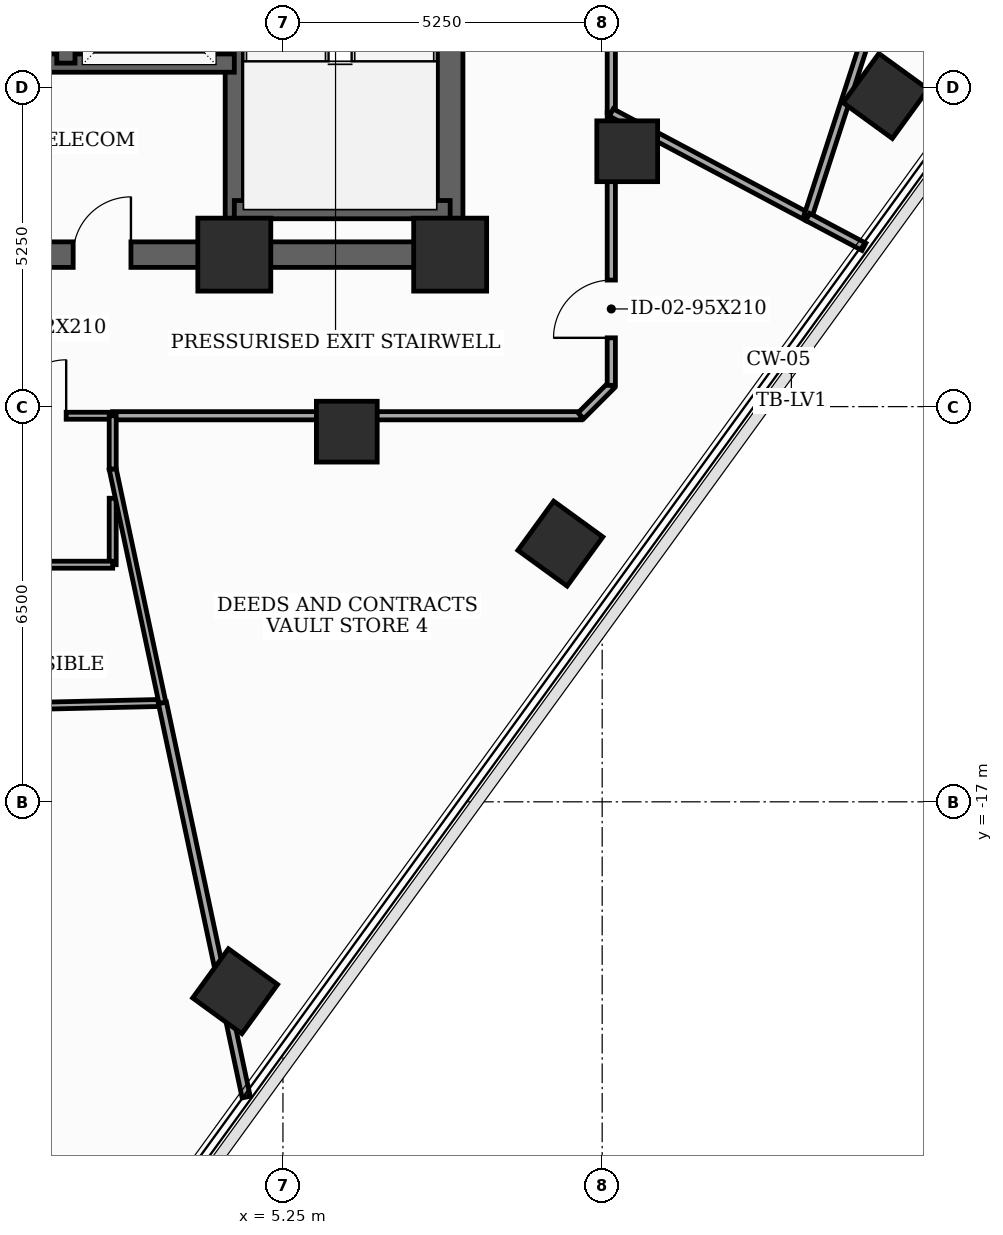
"""IFC4 building model, lengths in metres.
Left out: names, types, materials, properties, quantities, classifications, styles, units other than length and angle.
Written with IfcOpenShell. Run it as: python <this file> out.ifc"""

import sys

from ifc_helpers import new_model, si_unit, direction, frame, frame_2d, origin, origin_2d, place, context, subcontext, project, spatial, rectangle, extrude, element, fill, save


model = new_model("IFC4")
c1 = context("Model", 3, precision=1e-05, world=origin(), true_north=direction((0.0, 1.0)))
c2 = subcontext(c1, "Body", "Model", "MODEL_VIEW")
j1 = project(units=[si_unit("LENGTHUNIT", "METRE"), si_unit("PLANEANGLEUNIT", "RADIAN")], contexts=[c1])
p1 = place(None, origin())
s1 = spatial("IfcSite", under=j1, at=p1, CompositionType="ELEMENT")
p2 = place(p1, origin())
s2 = spatial("IfcBuilding", under=s1, at=p2, CompositionType="ELEMENT")
p3 = place(p2, frame((0.0, 0.0, 226.3)))
s3 = spatial("IfcBuildingStorey", under=s2, at=p3, CompositionType="ELEMENT", Elevation=226.3)
for number, where, z_axis, x_axis in (
    (1, (4.45, -8.0, 0.0), (0.0, 0.0, 1.0), (1.0, 0.0, 0.0)),
    (2, (8.0, -8.0, 0.0), (0.0, 0.0, 1.0), (1.0, 0.0, 0.0)),
):
    element("IfcColumn", number, at=place(p3, frame(where, z_axis=z_axis, x_axis=x_axis)), inside=s3, PredefinedType="COLUMN", context=c2, shape_type="SweptSolid", body=[
        extrude(rectangle(XDim=1.2, YDim=1.2, at=origin_2d()), origin(), (0.0, 0.0, 1.0), 3.7),
    ])
for number, where, z_axis, x_axis in (
    (3, (6.3, -10.912, 0.0), (0.0, 0.0, 1.0), (1.0, 0.0, 0.0)),
    (4, (10.912, -6.3, 0.0), (0.0, 0.0, 1.0), (1.0, 0.0, 0.0)),
    (5, (4.464, -20.115, 0.0), (0.0, 0.0, 1.0), (0.588, 0.809, 0.0)),
    (6, (9.812, -12.753, 0.0), (0.0, 0.0, 1.0), (0.588, 0.809, 0.0)),
    (7, (15.161, -5.391, 0.0), (0.0, 0.0, 1.0), (0.588, 0.809, 0.0)),
):
    element("IfcColumn", number, at=place(p3, frame(where, z_axis=z_axis, x_axis=x_axis)), inside=s3, PredefinedType="COLUMN", context=c2, shape_type="SweptSolid", body=[
        extrude(rectangle(XDim=1.0, YDim=1.0, at=origin_2d()), origin(), (0.0, 0.0, 1.0), 3.7),
    ])
p4 = place(p3, frame((8.0, -8.0, 0.0), z_axis=(0.0, 0.0, 1.0), x_axis=(0.0, 1.0, 0.0)))
e8 = element("IfcWall", 8, at=p4, inside=s3, PredefinedType="SHEAR", context=c2, shape_type="SweptSolid", body=[
    extrude(rectangle(XDim=16.0, YDim=0.42, at=frame_2d((8.0, 0.0))), origin(), (0.0, 0.0, 1.0), 3.5),
])
p5 = place(p4, frame((9.6, 0.0, 0.0)))
e9 = element("IfcOpeningElement", 9, at=p5, cuts=e8, PredefinedType="OPENING", context=c2, shape_type="SweptSolid", body=[
    extrude(rectangle(XDim=1.05, YDim=2.15, at=frame_2d((0.525, 1.075))), frame((0.0, 0.22, 0.0), z_axis=(0.0, -1.0, 0.0), x_axis=(1.0, 0.0, 0.0)), (0.0, 0.0, 1.0), 0.44),
])
p6 = place(p4, frame((14.389, 0.0, 0.0)))
e10 = element("IfcOpeningElement", 10, at=p6, cuts=e8, PredefinedType="OPENING", context=c2, shape_type="SweptSolid", body=[
    extrude(rectangle(XDim=0.85, YDim=2.02, at=frame_2d((0.425, 1.01))), frame((0.0, 0.22, 0.0), z_axis=(0.0, -1.0, 0.0), x_axis=(1.0, 0.0, 0.0)), (0.0, 0.0, 1.0), 0.44),
])
p7 = place(p3, frame((-8.0, -8.0, 0.0), z_axis=(0.0, 0.0, 1.0), x_axis=(1.0, 0.0, 0.0)))
e11 = element("IfcWall", 11, at=p7, inside=s3, PredefinedType="SHEAR", context=c2, shape_type="SweptSolid", body=[
    extrude(rectangle(XDim=16.0, YDim=0.42, at=frame_2d((8.0, 0.0))), origin(), (0.0, 0.0, 1.0), 3.5),
])
p8 = place(p7, frame((5.2, 0.0, 0.0)))
e12 = element("IfcOpeningElement", 12, at=p8, cuts=e11, PredefinedType="OPENING", context=c2, shape_type="SweptSolid", body=[
    extrude(rectangle(XDim=0.95, YDim=2.1, at=frame_2d((0.475, 1.05))), frame((0.0, 0.22, 0.0), z_axis=(0.0, -1.0, 0.0), x_axis=(1.0, 0.0, 0.0)), (0.0, 0.0, 1.0), 0.44),
])
p9 = place(p7, frame((9.8, 0.0, 0.0)))
e13 = element("IfcOpeningElement", 13, at=p9, cuts=e11, PredefinedType="OPENING", context=c2, shape_type="SweptSolid", body=[
    extrude(rectangle(XDim=0.95, YDim=2.1, at=frame_2d((0.475, 1.05))), frame((0.0, 0.22, 0.0), z_axis=(0.0, -1.0, 0.0), x_axis=(1.0, 0.0, 0.0)), (0.0, 0.0, 1.0), 0.44),
])
p10 = place(p3, frame((4.45, -7.79, 0.0), z_axis=(0.0, 0.0, 1.0), x_axis=(0.0, 1.0, 0.0)))
e14 = element("IfcWall", 14, at=p10, inside=s3, PredefinedType="SHEAR", context=c2, shape_type="SweptSolid", body=[
    extrude(rectangle(XDim=15.58, YDim=0.3, at=frame_2d((7.79, 0.0))), origin(), (0.0, 0.0, 1.0), 3.5),
])
p11 = place(p3, frame((4.45, -7.26, 0.0), z_axis=(0.0, 0.0, 1.0), x_axis=(1.0, 0.0, 0.0)))
e15 = element("IfcWall", 15, at=p11, inside=s3, PredefinedType="SHEAR", context=c2, shape_type="SweptSolid", body=[
    extrude(rectangle(XDim=3.55, YDim=0.3, at=frame_2d((1.775, 0.0))), origin(), (0.0, 0.0, 1.0), 3.5),
])
p12 = place(p3, frame((-4.45, -4.85, 0.0), z_axis=(0.0, 0.0, 1.0), x_axis=(1.0, 0.0, 0.0)))
e16 = element("IfcWall", 16, at=p12, inside=s3, PredefinedType="SHEAR", context=c2, shape_type="SweptSolid", body=[
    extrude(rectangle(XDim=8.9, YDim=0.3, at=frame_2d((4.45, 0.0))), origin(), (0.0, 0.0, 1.0), 3.5),
])
p13 = place(p3, frame((1.68, -4.85, 0.0), z_axis=(0.0, 0.0, 1.0), x_axis=(0.0, 1.0, 0.0)))
e17 = element("IfcWall", 17, at=p13, inside=s3, PredefinedType="SHEAR", context=c2, shape_type="SweptSolid", body=[
    extrude(rectangle(XDim=12.64, YDim=0.3, at=frame_2d((6.32, 0.0))), origin(), (0.0, 0.0, 1.0), 3.5),
])
p14 = place(p13, frame((0.55, 0.0, 0.0)))
e18 = element("IfcOpeningElement", 18, at=p14, cuts=e17, PredefinedType="OPENING", context=c2, shape_type="SweptSolid", body=[
    extrude(rectangle(XDim=1.1, YDim=2.1, at=frame_2d((0.55, 1.05))), frame((0.0, 0.16, 0.0), z_axis=(0.0, -1.0, 0.0), x_axis=(1.0, 0.0, 0.0)), (0.0, 0.0, 1.0), 0.32),
])
p15 = place(p13, frame((2.65, 0.0, 0.0)))
e19 = element("IfcOpeningElement", 19, at=p15, cuts=e17, PredefinedType="OPENING", context=c2, shape_type="SweptSolid", body=[
    extrude(rectangle(XDim=1.1, YDim=2.1, at=frame_2d((0.55, 1.05))), frame((0.0, 0.16, 0.0), z_axis=(0.0, -1.0, 0.0), x_axis=(1.0, 0.0, 0.0)), (0.0, 0.0, 1.0), 0.32),
])
p16 = place(p13, frame((4.75, 0.0, 0.0)))
e20 = element("IfcOpeningElement", 20, at=p16, cuts=e17, PredefinedType="OPENING", context=c2, shape_type="SweptSolid", body=[
    extrude(rectangle(XDim=1.1, YDim=2.1, at=frame_2d((0.55, 1.05))), frame((0.0, 0.16, 0.0), z_axis=(0.0, -1.0, 0.0), x_axis=(1.0, 0.0, 0.0)), (0.0, 0.0, 1.0), 0.32),
])
p17 = place(p13, frame((8.9, 0.0, 0.0)))
e21 = element("IfcOpeningElement", 21, at=p17, cuts=e17, PredefinedType="OPENING", context=c2, shape_type="SweptSolid", body=[
    extrude(rectangle(XDim=0.95, YDim=2.1, at=frame_2d((0.475, 1.05))), frame((0.0, 0.16, 0.0), z_axis=(0.0, -1.0, 0.0), x_axis=(1.0, 0.0, 0.0)), (0.0, 0.0, 1.0), 0.32),
])
p18 = place(p3, frame((10.65, -5.663, 0.0), z_axis=(0.0, 0.0, 1.0), x_axis=(0.0, 1.0, 0.0)))
e22 = element("IfcWall", 22, at=p18, inside=s3, PredefinedType="PARTITIONING", context=c2, shape_type="SweptSolid", body=[
    extrude(rectangle(XDim=7.145, YDim=0.135, at=frame_2d((3.573, 0.0))), origin(), (0.0, 0.0, 1.0), 2.885),
])
p19 = place(p18, frame((3.097, 0.0, 0.0)))
e23 = element("IfcOpeningElement", 23, at=p19, cuts=e22, PredefinedType="OPENING", context=c2, shape_type="SweptSolid", body=[
    extrude(rectangle(XDim=0.95, YDim=2.1, at=frame_2d((0.475, 1.05))), frame((0.0, 0.077, 0.0), z_axis=(0.0, -1.0, 0.0), x_axis=(1.0, 0.0, 0.0)), (0.0, 0.0, 1.0), 0.155),
])
p20 = place(p3, frame((0.0, -10.65, 0.0), z_axis=(0.0, 0.0, 1.0), x_axis=(1.0, 0.0, 0.0)))
e24 = element("IfcWall", 24, at=p20, inside=s3, PredefinedType="PARTITIONING", context=c2, shape_type="SweptSolid", body=[
    extrude(rectangle(XDim=2.45, YDim=0.115, at=frame_2d((1.225, 0.0))), origin(), (0.0, 0.0, 1.0), 3.5),
])
p21 = place(p20, frame((0.765, 0.0, 0.0)))
e25 = element("IfcOpeningElement", 25, at=p21, cuts=e24, PredefinedType="OPENING", context=c2, shape_type="SweptSolid", body=[
    extrude(rectangle(XDim=0.92, YDim=2.1, at=frame_2d((0.46, 1.05))), frame((0.0, 0.067, 0.0), z_axis=(0.0, -1.0, 0.0), x_axis=(1.0, 0.0, 0.0)), (0.0, 0.0, 1.0), 0.135),
])
p22 = place(p3, frame((2.45, -10.65, 0.0), z_axis=(0.0, 0.0, 1.0), x_axis=(1.0, 0.0, 0.0)))
e26 = element("IfcWall", 26, at=p22, inside=s3, PredefinedType="PARTITIONING", context=c2, shape_type="SweptSolid", body=[
    extrude(rectangle(XDim=7.7, YDim=0.135, at=frame_2d((3.85, 0.0))), origin(), (0.0, 0.0, 1.0), 2.885),
])
p23 = place(p3, frame((10.15, -10.65, 0.0), z_axis=(0.0, 0.0, 1.0), x_axis=(0.707106781187, 0.707106781187, 0.0)))
e27 = element("IfcWall", 27, at=p23, inside=s3, PredefinedType="PARTITIONING", context=c2, shape_type="SweptSolid", body=[
    extrude(rectangle(XDim=0.707, YDim=0.135, at=frame_2d((0.354, 0.0))), origin(), (0.0, 0.0, 1.0), 3.5),
])
p24 = place(p3, frame((10.65, -10.15, 0.0), z_axis=(0.0, 0.0, 1.0), x_axis=(0.0, 1.0, 0.0)))
e28 = element("IfcWall", 28, at=p24, inside=s3, PredefinedType="PARTITIONING", context=c2, shape_type="SweptSolid", body=[
    extrude(rectangle(XDim=4.487, YDim=0.135, at=frame_2d((2.243, 0.0))), origin(), (0.0, 0.0, 1.0), 2.885),
])
p25 = place(p24, frame((0.781, 0.0, 0.0)))
e29 = element("IfcOpeningElement", 29, at=p25, cuts=e28, PredefinedType="OPENING", context=c2, shape_type="SweptSolid", body=[
    extrude(rectangle(XDim=0.95, YDim=2.1, at=frame_2d((0.475, 1.05))), frame((0.0, 0.077, 0.0), z_axis=(0.0, -1.0, 0.0), x_axis=(1.0, 0.0, 0.0)), (0.0, 0.0, 1.0), 0.155),
])
p26 = place(p3, frame((10.65, -5.663, 0.0), z_axis=(0.0, 0.0, 1.0), x_axis=(0.882952413676, -0.469462496036, 0.0)))
e30 = element("IfcWall", 30, at=p26, inside=s3, PredefinedType="PARTITIONING", context=c2, shape_type="SweptSolid", body=[
    extrude(rectangle(XDim=3.659, YDim=0.135, at=frame_2d((1.83, 0.0))), origin(), (0.0, 0.0, 1.0), 2.885),
])
p27 = place(p3, frame((13.881, -7.381, 0.0), z_axis=(0.0, 0.0, 1.0), x_axis=(0.309006266506, 0.951060001924, 0.0)))
e31 = element("IfcWall", 31, at=p27, inside=s3, PredefinedType="PARTITIONING", context=c2, shape_type="SweptSolid", body=[
    extrude(rectangle(XDim=5.88, YDim=0.135, at=frame_2d((2.94, 0.0))), origin(), (0.0, 0.0, 1.0), 2.985),
])
p28 = place(p3, frame((-2.97, -15.518, 0.0), z_axis=(0.0, 0.0, 1.0), x_axis=(0.99972988351, 0.023241342836, 0.0)))
e32 = element("IfcWall", 32, at=p28, inside=s3, PredefinedType="PARTITIONING", context=c2, shape_type="SweptSolid", body=[
    extrude(rectangle(XDim=6.24, YDim=0.115, at=frame_2d((3.12, 0.0))), origin(), (0.0, 0.0, 1.0), 2.985),
])
p29 = place(p3, frame((2.45, -12.007, 0.0), z_axis=(0.0, 0.0, 1.0), x_axis=(0.0, -1.0, 0.0)))
e33 = element("IfcWall", 33, at=p29, inside=s3, PredefinedType="PARTITIONING", context=c2, shape_type="SweptSolid", body=[
    extrude(rectangle(XDim=1.093, YDim=0.115, at=frame_2d((0.547, 0.0))), origin(), (0.0, 0.0, 1.0), 2.885),
])
p30 = place(p3, frame((2.45, -13.1, 0.0), z_axis=(0.0, 0.0, 1.0), x_axis=(-1.0, 0.0, 0.0)))
e34 = element("IfcWall", 34, at=p30, inside=s3, PredefinedType="PARTITIONING", context=c2, shape_type="SweptSolid", body=[
    extrude(rectangle(XDim=2.45, YDim=0.115, at=frame_2d((1.225, 0.0))), origin(), (0.0, 0.0, 1.0), 2.985),
])
p31 = place(p3, frame((3.268, -15.373, 0.0), z_axis=(0.0, 0.0, 1.0), x_axis=(-0.208002774368, 0.978128235895, 0.0)))
e35 = element("IfcWall", 35, at=p31, inside=s3, PredefinedType="PARTITIONING", context=c2, shape_type="SweptSolid", body=[
    extrude(rectangle(XDim=3.933, YDim=0.115, at=frame_2d((1.967, 0.0))), origin(), (0.0, 0.0, 1.0), 2.885),
])
p32 = place(p3, frame((4.645, -21.856, 0.0), z_axis=(0.0, 0.0, 1.0), x_axis=(-0.207797956892, 0.978171768715, 0.0)))
e36 = element("IfcWall", 36, at=p32, inside=s3, PredefinedType="PARTITIONING", context=c2, shape_type="SweptSolid", body=[
    extrude(rectangle(XDim=6.628, YDim=0.135, at=frame_2d((3.314, 0.0))), origin(), (0.0, 0.0, 1.0), 2.985),
])
p33 = place(p3, frame((2.45, -11.526, 0.0), z_axis=(0.0, 0.0, 1.0), x_axis=(0.0, 1.0, 0.0)))
e37 = element("IfcWall", 37, at=p33, inside=s3, PredefinedType="PARTITIONING", context=c2, shape_type="SweptSolid", body=[
    extrude(rectangle(XDim=0.876, YDim=0.115, at=frame_2d((0.438, 0.0))), origin(), (0.0, 0.0, 1.0), 3.5),
])
p34 = place(p3, frame((14.805, -7.872, 0.0), z_axis=(0.0, 0.0, 1.0), x_axis=(-0.883242549552, 0.468916409033, 0.0)))
e38 = element("IfcWall", 38, at=p34, inside=s3, PredefinedType="PARTITIONING", context=c2, shape_type="SweptSolid", body=[
    extrude(rectangle(XDim=1.046, YDim=0.135, at=frame_2d((0.523, 0.0))), origin(), (0.0, 0.0, 1.0), 3.035),
])
p35 = place(p9, origin())
e39 = element("IfcDoor", 39, at=p35, inside=s3, OperationType="SINGLE_SWING_RIGHT", PredefinedType="DOOR", context=c2, shape_type="SweptSolid", body=[
    extrude(rectangle(XDim=0.95, YDim=2.1, at=frame_2d((0.475, 1.05))), frame((0.0, 0.025, 0.0), z_axis=(0.0, -1.0, 0.0), x_axis=(1.0, 0.0, 0.0)), (0.0, 0.0, 1.0), 0.05),
])
fill(e13, e39)
p36 = place(p21, origin())
e40 = element("IfcDoor", 40, at=p36, inside=s3, OperationType="SINGLE_SWING_RIGHT", PredefinedType="DOOR", context=c2, shape_type="SweptSolid", body=[
    extrude(rectangle(XDim=0.92, YDim=2.1, at=frame_2d((0.46, 1.05))), frame((0.0, 0.025, 0.0), z_axis=(0.0, -1.0, 0.0), x_axis=(1.0, 0.0, 0.0)), (0.0, 0.0, 1.0), 0.05),
])
fill(e25, e40)
p37 = place(p25, origin())
e41 = element("IfcDoor", 41, at=p37, inside=s3, OperationType="SINGLE_SWING_LEFT", PredefinedType="DOOR", context=c2, shape_type="SweptSolid", body=[
    extrude(rectangle(XDim=0.95, YDim=2.1, at=frame_2d((0.475, 1.05))), frame((0.0, 0.025, 0.0), z_axis=(0.0, -1.0, 0.0), x_axis=(1.0, 0.0, 0.0)), (0.0, 0.0, 1.0), 0.05),
])
fill(e29, e41)
save(model, sys.argv[1])
